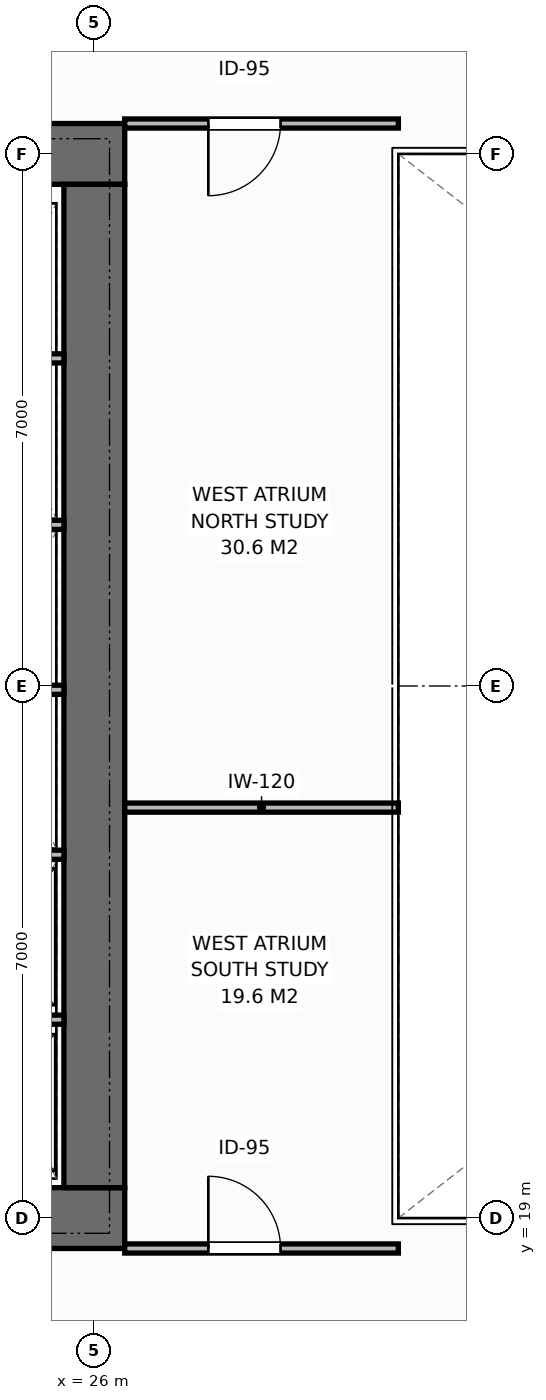
"""IFC4 building model, lengths in metres.
Left out: names, types, materials, properties, quantities, classifications, styles, units other than length and angle.
Written with IfcOpenShell. Run it as: python <this file> out.ifc"""

import sys

from ifc_helpers import new_model, si_unit, direction, frame, frame_2d, origin, place, context, subcontext, project, spatial, rectangle, extrude, element, fill, save


model = new_model("IFC4")
c1 = context("Model", 3, precision=1e-05, world=origin(), true_north=direction((0.0, 1.0)))
c2 = subcontext(c1, "Body", "Model", "MODEL_VIEW")
j1 = project(units=[si_unit("LENGTHUNIT", "METRE"), si_unit("PLANEANGLEUNIT", "RADIAN")], contexts=[c1])
p1 = place(None, origin())
s1 = spatial("IfcSite", under=j1, at=p1, CompositionType="ELEMENT")
p2 = place(p1, origin())
s2 = spatial("IfcBuilding", under=s1, at=p2, CompositionType="ELEMENT")
p3 = place(p2, frame((0.0, 0.0, 73.4)))
s3 = spatial("IfcBuildingStorey", under=s2, at=p3, CompositionType="ELEMENT", Elevation=73.4)
p4 = place(p3, frame((12.6, 19.0, 0.0), z_axis=(0.0, 0.0, 1.0), x_axis=(1.0, 0.0, 0.0)))
e1 = element("IfcWall", 1, at=p4, inside=s3, PredefinedType="SHEAR", context=c2, shape_type="SweptSolid", body=[
    extrude(rectangle(XDim=13.8, YDim=0.8, at=frame_2d((6.9, 0.0))), origin(), (0.0, 0.0, 1.0), 3.8),
])
p5 = place(p4, frame((9.28, 0.0, 0.0)))
e2 = element("IfcOpeningElement", 2, at=p5, cuts=e1, PredefinedType="OPENING", context=c2, shape_type="SweptSolid", body=[
    extrude(rectangle(XDim=1.4, YDim=2.2, at=frame_2d((0.7, 1.1))), frame((0.0, 0.41, 0.0), z_axis=(0.0, -1.0, 0.0), x_axis=(1.0, 0.0, 0.0)), (0.0, 0.0, 1.0), 0.82),
])
p6 = place(p3, frame((12.6, 33.0, 0.0), z_axis=(0.0, 0.0, 1.0), x_axis=(1.0, 0.0, 0.0)))
e3 = element("IfcWall", 3, at=p6, inside=s3, PredefinedType="SHEAR", context=c2, shape_type="SweptSolid", body=[
    extrude(rectangle(XDim=13.8, YDim=0.8, at=frame_2d((6.9, 0.0))), origin(), (0.0, 0.0, 1.0), 3.8),
])
p7 = place(p6, frame((1.3, 0.0, 0.0)))
e4 = element("IfcOpeningElement", 4, at=p7, cuts=e3, PredefinedType="OPENING", context=c2, shape_type="SweptSolid", body=[
    extrude(rectangle(XDim=0.9, YDim=2.15, at=frame_2d((0.45, 1.075))), frame((0.0, 0.41, 0.0), z_axis=(0.0, -1.0, 0.0), x_axis=(1.0, 0.0, 0.0)), (0.0, 0.0, 1.0), 0.82),
])
p8 = place(p6, frame((3.2, 0.0, 0.0)))
e5 = element("IfcOpeningElement", 5, at=p8, cuts=e3, PredefinedType="OPENING", context=c2, shape_type="SweptSolid", body=[
    extrude(rectangle(XDim=0.9, YDim=2.15, at=frame_2d((0.45, 1.075))), frame((0.0, 0.41, 0.0), z_axis=(0.0, -1.0, 0.0), x_axis=(1.0, 0.0, 0.0)), (0.0, 0.0, 1.0), 0.82),
])
p9 = place(p6, frame((5.0, 0.0, 0.0)))
e6 = element("IfcOpeningElement", 6, at=p9, cuts=e3, PredefinedType="OPENING", context=c2, shape_type="SweptSolid", body=[
    extrude(rectangle(XDim=0.9, YDim=2.15, at=frame_2d((0.45, 1.075))), frame((0.0, 0.41, 0.0), z_axis=(0.0, -1.0, 0.0), x_axis=(1.0, 0.0, 0.0)), (0.0, 0.0, 1.0), 0.82),
])
p10 = place(p6, frame((6.9, 0.0, 0.0)))
e7 = element("IfcOpeningElement", 7, at=p10, cuts=e3, PredefinedType="OPENING", context=c2, shape_type="SweptSolid", body=[
    extrude(rectangle(XDim=0.9, YDim=2.15, at=frame_2d((0.45, 1.075))), frame((0.0, 0.41, 0.0), z_axis=(0.0, -1.0, 0.0), x_axis=(1.0, 0.0, 0.0)), (0.0, 0.0, 1.0), 0.82),
])
p11 = place(p6, frame((9.28, 0.0, 0.0)))
e8 = element("IfcOpeningElement", 8, at=p11, cuts=e3, PredefinedType="OPENING", context=c2, shape_type="SweptSolid", body=[
    extrude(rectangle(XDim=1.4, YDim=2.2, at=frame_2d((0.7, 1.1))), frame((0.0, 0.41, 0.0), z_axis=(0.0, -1.0, 0.0), x_axis=(1.0, 0.0, 0.0)), (0.0, 0.0, 1.0), 0.82),
])
p12 = place(p3, frame((26.0, 19.4, 0.0), z_axis=(0.0, 0.0, 1.0), x_axis=(0.0, 1.0, 0.0)))
e9 = element("IfcWall", 9, at=p12, inside=s3, PredefinedType="SHEAR", context=c2, shape_type="SweptSolid", body=[
    extrude(rectangle(XDim=13.2, YDim=0.8, at=frame_2d((6.6, 0.0))), origin(), (0.0, 0.0, 1.0), 3.8),
])
for number, where, z_axis, x_axis in (
    (10, (23.4, 21.61, 0.0), (0.0, 0.0, 1.0), (1.0, 0.0, 0.0)),
    (11, (23.4, 23.78, 0.0), (0.0, 0.0, 1.0), (1.0, 0.0, 0.0)),
    (12, (23.4, 25.95, 0.0), (0.0, 0.0, 1.0), (1.0, 0.0, 0.0)),
    (13, (23.4, 28.12, 0.0), (0.0, 0.0, 1.0), (1.0, 0.0, 0.0)),
    (14, (23.4, 30.31, 0.0), (0.0, 0.0, 1.0), (1.0, 0.0, 0.0)),
):
    element("IfcWall", number, at=place(p3, frame(where, z_axis=z_axis, x_axis=x_axis)), inside=s3, PredefinedType="PARTITIONING", context=c2, shape_type="SweptSolid", body=[
        extrude(rectangle(XDim=2.2, YDim=0.12, at=frame_2d((1.1, 0.0))), origin(), (0.0, 0.0, 1.0), 3.55),
    ])
p13 = place(p3, frame((26.4, 24.4, 0.0), z_axis=(0.0, 0.0, 1.0), x_axis=(1.0, 0.0, 0.0)))
e15 = element("IfcWall", 15, at=p13, inside=s3, PredefinedType="PARTITIONING", context=c2, shape_type="SweptSolid", body=[
    extrude(rectangle(XDim=3.6, YDim=0.12, at=frame_2d((1.8, 0.0))), origin(), (0.0, 0.0, 1.0), 3.55),
])
p14 = place(p3, frame((26.4, 18.6, 0.0), z_axis=(0.0, 0.0, 1.0), x_axis=(1.0, 0.0, 0.0)))
e16 = element("IfcWall", 16, at=p14, inside=s3, PredefinedType="PARTITIONING", context=c2, shape_type="SweptSolid", body=[
    extrude(rectangle(XDim=3.6, YDim=0.12, at=frame_2d((1.8, 0.0))), origin(), (0.0, 0.0, 1.0), 3.55),
])
p15 = place(p14, frame((1.1, 0.0, 0.0)))
e17 = element("IfcOpeningElement", 17, at=p15, cuts=e16, PredefinedType="OPENING", context=c2, shape_type="SweptSolid", body=[
    extrude(rectangle(XDim=0.95, YDim=2.15, at=frame_2d((0.475, 1.075))), frame((0.0, 0.07, 0.0), z_axis=(0.0, -1.0, 0.0), x_axis=(1.0, 0.0, 0.0)), (0.0, 0.0, 1.0), 0.14),
])
p16 = place(p3, frame((26.4, 33.4, 0.0), z_axis=(0.0, 0.0, 1.0), x_axis=(1.0, 0.0, 0.0)))
e18 = element("IfcWall", 18, at=p16, inside=s3, PredefinedType="PARTITIONING", context=c2, shape_type="SweptSolid", body=[
    extrude(rectangle(XDim=3.6, YDim=0.12, at=frame_2d((1.8, 0.0))), origin(), (0.0, 0.0, 1.0), 3.55),
])
p17 = place(p16, frame((1.1, 0.0, 0.0)))
e19 = element("IfcOpeningElement", 19, at=p17, cuts=e18, PredefinedType="OPENING", context=c2, shape_type="SweptSolid", body=[
    extrude(rectangle(XDim=0.95, YDim=2.15, at=frame_2d((0.475, 1.075))), frame((0.0, 0.07, 0.0), z_axis=(0.0, -1.0, 0.0), x_axis=(1.0, 0.0, 0.0)), (0.0, 0.0, 1.0), 0.14),
])
p18 = place(p15, origin())
e20 = element("IfcDoor", 20, at=p18, inside=s3, OperationType="SINGLE_SWING_LEFT", PredefinedType="DOOR", context=c2, shape_type="SweptSolid", body=[
    extrude(rectangle(XDim=0.95, YDim=2.15, at=frame_2d((0.475, 1.075))), frame((0.0, 0.025, 0.0), z_axis=(0.0, -1.0, 0.0), x_axis=(1.0, 0.0, 0.0)), (0.0, 0.0, 1.0), 0.05),
])
fill(e17, e20)
p19 = place(p17, origin())
e21 = element("IfcDoor", 21, at=p19, inside=s3, OperationType="SINGLE_SWING_RIGHT", PredefinedType="DOOR", context=c2, shape_type="SweptSolid", body=[
    extrude(rectangle(XDim=0.95, YDim=2.15, at=frame_2d((0.475, 1.075))), frame((0.0, 0.025, 0.0), z_axis=(0.0, -1.0, 0.0), x_axis=(1.0, 0.0, 0.0)), (0.0, 0.0, 1.0), 0.05),
])
fill(e19, e21)
save(model, sys.argv[1])
